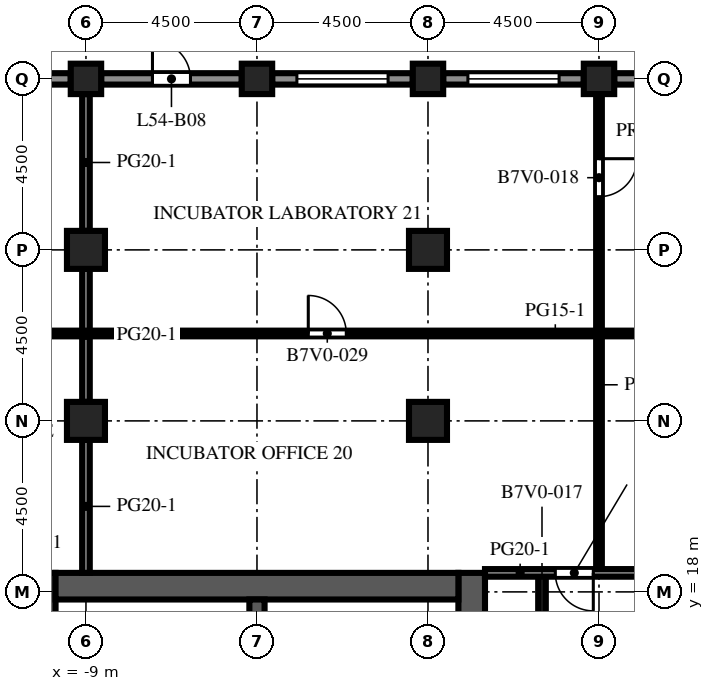
"""IFC4 building model, lengths in metres.
Left out: names, types, materials, properties, quantities, classifications, styles, units other than length and angle.
Written with IfcOpenShell. Run it as: python <this file> out.ifc"""

import sys

from ifc_helpers import new_model, si_unit, direction, frame, frame_2d, origin, origin_2d, place, context, subcontext, project, spatial, rectangle, extrude, element, fill, save


model = new_model("IFC4")
c1 = context("Model", 3, precision=1e-05, world=origin(), true_north=direction((0.0, 1.0)))
c2 = subcontext(c1, "Body", "Model", "MODEL_VIEW")
j1 = project(units=[si_unit("LENGTHUNIT", "METRE"), si_unit("PLANEANGLEUNIT", "RADIAN")], contexts=[c1])
p1 = place(None, origin())
s1 = spatial("IfcSite", under=j1, at=p1, CompositionType="ELEMENT")
p2 = place(p1, origin())
s2 = spatial("IfcBuilding", under=s1, at=p2, CompositionType="ELEMENT")
p3 = place(p2, frame((0.0, 0.0, 239.8)))
s3 = spatial("IfcBuildingStorey", under=s2, at=p3, CompositionType="ELEMENT", Elevation=239.8)
for number, where, z_axis, x_axis in (
    (1, (-9.0, 31.5, 0.0), (0.0, 0.0, 1.0), (1.0, 0.0, 0.0)),
    (2, (-4.5, 31.5, 0.0), (0.0, 0.0, 1.0), (1.0, 0.0, 0.0)),
    (3, (0.0, 31.5, 0.0), (0.0, 0.0, 1.0), (1.0, 0.0, 0.0)),
    (4, (4.5, 31.5, 0.0), (0.0, 0.0, 1.0), (1.0, 0.0, 0.0)),
):
    element("IfcColumn", number, at=place(p3, frame(where, z_axis=z_axis, x_axis=x_axis)), inside=s3, PredefinedType="COLUMN", context=c2, shape_type="SweptSolid", body=[
        extrude(rectangle(XDim=0.8, YDim=0.8, at=origin_2d()), origin(), (0.0, 0.0, 1.0), 4.1),
    ])
for number, where, z_axis, x_axis in (
    (5, (-9.0, 22.5, 0.0), (0.0, 0.0, 1.0), (1.0, 0.0, 0.0)),
    (6, (-9.0, 27.0, 0.0), (0.0, 0.0, 1.0), (1.0, 0.0, 0.0)),
    (7, (0.0, 22.5, 0.0), (0.0, 0.0, 1.0), (1.0, 0.0, 0.0)),
    (8, (0.0, 27.0, 0.0), (0.0, 0.0, 1.0), (1.0, 0.0, 0.0)),
):
    element("IfcColumn", number, at=place(p3, frame(where, z_axis=z_axis, x_axis=x_axis)), inside=s3, PredefinedType="COLUMN", context=c2, shape_type="SweptSolid", body=[
        extrude(rectangle(XDim=1.0, YDim=1.0, at=origin_2d()), origin(), (0.0, 0.0, 1.0), 4.1),
    ])
p4 = place(p3, frame((-10.15, -9.0, 0.0), z_axis=(0.0, 0.0, 1.0), x_axis=(0.0, 1.0, 0.0)))
e9 = element("IfcWall", 9, at=p4, inside=s3, PredefinedType="SHEAR", context=c2, shape_type="SweptSolid", body=[
    extrude(rectangle(XDim=27.5, YDim=0.7, at=frame_2d((13.75, 0.0))), origin(), (0.0, 0.0, 1.0), 4.1),
])
p5 = place(p4, frame((12.55, 0.0, 0.0)))
e10 = element("IfcOpeningElement", 10, at=p5, cuts=e9, PredefinedType="OPENING", context=c2, shape_type="SweptSolid", body=[
    extrude(rectangle(XDim=2.4, YDim=2.4, at=frame_2d((1.2, 1.2))), frame((0.0, 0.36, 0.0), z_axis=(0.0, -1.0, 0.0), x_axis=(1.0, 0.0, 0.0)), (0.0, 0.0, 1.0), 0.72),
])
p6 = place(p4, frame((6.825, 0.0, 0.0)))
e11 = element("IfcOpeningElement", 11, at=p6, cuts=e9, PredefinedType="OPENING", context=c2, shape_type="SweptSolid", body=[
    extrude(rectangle(XDim=1.2, YDim=2.1, at=frame_2d((0.6, 1.05))), frame((0.0, 0.36, 0.0), z_axis=(0.0, -1.0, 0.0), x_axis=(1.0, 0.0, 0.0)), (0.0, 0.0, 1.0), 0.72),
])
p7 = place(p4, frame((19.475, 0.0, 0.0)))
e12 = element("IfcOpeningElement", 12, at=p7, cuts=e9, PredefinedType="OPENING", context=c2, shape_type="SweptSolid", body=[
    extrude(rectangle(XDim=1.2, YDim=2.1, at=frame_2d((0.6, 1.05))), frame((0.0, 0.36, 0.0), z_axis=(0.0, -1.0, 0.0), x_axis=(1.0, 0.0, 0.0)), (0.0, 0.0, 1.0), 0.72),
])
p8 = place(p3, frame((1.15, -9.0, 0.0), z_axis=(0.0, 0.0, 1.0), x_axis=(0.0, 1.0, 0.0)))
e13 = element("IfcWall", 13, at=p8, inside=s3, PredefinedType="SHEAR", context=c2, shape_type="SweptSolid", body=[
    extrude(rectangle(XDim=27.5, YDim=0.7, at=frame_2d((13.75, 0.0))), origin(), (0.0, 0.0, 1.0), 4.1),
])
p9 = place(p8, frame((12.55, 0.0, 0.0)))
e14 = element("IfcOpeningElement", 14, at=p9, cuts=e13, PredefinedType="OPENING", context=c2, shape_type="SweptSolid", body=[
    extrude(rectangle(XDim=2.4, YDim=2.4, at=frame_2d((1.2, 1.2))), frame((0.0, 0.36, 0.0), z_axis=(0.0, -1.0, 0.0), x_axis=(1.0, 0.0, 0.0)), (0.0, 0.0, 1.0), 0.72),
])
p10 = place(p8, frame((5.42, 0.0, 0.0)))
e15 = element("IfcOpeningElement", 15, at=p10, cuts=e13, PredefinedType="OPENING", context=c2, shape_type="SweptSolid", body=[
    extrude(rectangle(XDim=1.2, YDim=2.1, at=frame_2d((0.6, 1.05))), frame((0.0, 0.36, 0.0), z_axis=(0.0, -1.0, 0.0), x_axis=(1.0, 0.0, 0.0)), (0.0, 0.0, 1.0), 0.72),
])
p11 = place(p8, frame((19.46, 0.0, 0.0)))
e16 = element("IfcOpeningElement", 16, at=p11, cuts=e13, PredefinedType="OPENING", context=c2, shape_type="SweptSolid", body=[
    extrude(rectangle(XDim=1.0, YDim=2.1, at=frame_2d((0.5, 1.05))), frame((0.0, 0.36, 0.0), z_axis=(0.0, -1.0, 0.0), x_axis=(1.0, 0.0, 0.0)), (0.0, 0.0, 1.0), 0.72),
])
p12 = place(p8, frame((21.17, 0.0, 0.0)))
e17 = element("IfcOpeningElement", 17, at=p12, cuts=e13, PredefinedType="OPENING", context=c2, shape_type="SweptSolid", body=[
    extrude(rectangle(XDim=1.0, YDim=2.1, at=frame_2d((0.5, 1.05))), frame((0.0, 0.36, 0.0), z_axis=(0.0, -1.0, 0.0), x_axis=(1.0, 0.0, 0.0)), (0.0, 0.0, 1.0), 0.72),
])
p13 = place(p8, frame((23.26, 0.0, 0.0)))
e18 = element("IfcOpeningElement", 18, at=p13, cuts=e13, PredefinedType="OPENING", context=c2, shape_type="SweptSolid", body=[
    extrude(rectangle(XDim=1.0, YDim=2.1, at=frame_2d((0.5, 1.05))), frame((0.0, 0.36, 0.0), z_axis=(0.0, -1.0, 0.0), x_axis=(1.0, 0.0, 0.0)), (0.0, 0.0, 1.0), 0.72),
])
p14 = place(p8, frame((25.35, 0.0, 0.0)))
e19 = element("IfcOpeningElement", 19, at=p14, cuts=e13, PredefinedType="OPENING", context=c2, shape_type="SweptSolid", body=[
    extrude(rectangle(XDim=1.0, YDim=2.1, at=frame_2d((0.5, 1.05))), frame((0.0, 0.36, 0.0), z_axis=(0.0, -1.0, 0.0), x_axis=(1.0, 0.0, 0.0)), (0.0, 0.0, 1.0), 0.72),
])
p15 = place(p3, frame((-9.8, 18.15, 0.0), z_axis=(0.0, 0.0, 1.0), x_axis=(1.0, 0.0, 0.0)))
e20 = element("IfcWall", 20, at=p15, inside=s3, PredefinedType="SHEAR", context=c2, shape_type="SweptSolid", body=[
    extrude(rectangle(XDim=10.6, YDim=0.7, at=frame_2d((5.3, 0.0))), origin(), (0.0, 0.0, 1.0), 4.1),
])
p16 = place(p3, frame((-4.5, 10.2, 0.0), z_axis=(0.0, 0.0, 1.0), x_axis=(0.0, 1.0, 0.0)))
e21 = element("IfcWall", 21, at=p16, inside=s3, PredefinedType="SHEAR", context=c2, shape_type="SweptSolid", body=[
    extrude(rectangle(XDim=7.6, YDim=0.4, at=frame_2d((3.8, 0.0))), origin(), (0.0, 0.0, 1.0), 4.1),
])
p17 = place(p3, frame((4.9, 31.5, 0.0), z_axis=(0.0, 0.0, 1.0), x_axis=(1.0, 0.0, 0.0)))
e22 = element("IfcWall", 22, at=p17, inside=s3, PredefinedType="SOLIDWALL", context=c2, shape_type="SweptSolid", body=[
    extrude(rectangle(XDim=3.7, YDim=0.3, at=frame_2d((1.85, 0.0))), origin(), (0.0, 0.0, 1.0), 2.85),
])
p18 = place(p17, frame((0.65, 0.0, 0.8)))
e23 = element("IfcOpeningElement", 23, at=p18, cuts=e22, PredefinedType="OPENING", context=c2, shape_type="SweptSolid", body=[
    extrude(rectangle(XDim=2.4, YDim=1.7, at=frame_2d((1.2, 0.85))), frame((0.0, 0.16, 0.0), z_axis=(0.0, -1.0, 0.0), x_axis=(1.0, 0.0, 0.0)), (0.0, 0.0, 1.0), 0.32),
])
p19 = place(p3, frame((0.4, 31.5, 0.0), z_axis=(0.0, 0.0, 1.0), x_axis=(1.0, 0.0, 0.0)))
e24 = element("IfcWall", 24, at=p19, inside=s3, PredefinedType="SOLIDWALL", context=c2, shape_type="SweptSolid", body=[
    extrude(rectangle(XDim=3.7, YDim=0.3, at=frame_2d((1.85, 0.0))), origin(), (0.0, 0.0, 1.0), 2.85),
])
p20 = place(p19, frame((0.65, 0.0, 0.8)))
e25 = element("IfcOpeningElement", 25, at=p20, cuts=e24, PredefinedType="OPENING", context=c2, shape_type="SweptSolid", body=[
    extrude(rectangle(XDim=2.4, YDim=1.7, at=frame_2d((1.2, 0.85))), frame((0.0, 0.16, 0.0), z_axis=(0.0, -1.0, 0.0), x_axis=(1.0, 0.0, 0.0)), (0.0, 0.0, 1.0), 0.32),
])
p21 = place(p3, frame((-4.1, 31.5, 0.0), z_axis=(0.0, 0.0, 1.0), x_axis=(1.0, 0.0, 0.0)))
e26 = element("IfcWall", 26, at=p21, inside=s3, PredefinedType="SOLIDWALL", context=c2, shape_type="SweptSolid", body=[
    extrude(rectangle(XDim=3.7, YDim=0.3, at=frame_2d((1.85, 0.0))), origin(), (0.0, 0.0, 1.0), 2.85),
])
p22 = place(p21, frame((0.65, 0.0, 0.8)))
e27 = element("IfcOpeningElement", 27, at=p22, cuts=e26, PredefinedType="OPENING", context=c2, shape_type="SweptSolid", body=[
    extrude(rectangle(XDim=2.4, YDim=1.7, at=frame_2d((1.2, 0.85))), frame((0.0, 0.16, 0.0), z_axis=(0.0, -1.0, 0.0), x_axis=(1.0, 0.0, 0.0)), (0.0, 0.0, 1.0), 0.32),
])
p23 = place(p3, frame((-8.6, 31.5, 0.0), z_axis=(0.0, 0.0, 1.0), x_axis=(1.0, 0.0, 0.0)))
e28 = element("IfcWall", 28, at=p23, inside=s3, PredefinedType="SOLIDWALL", context=c2, shape_type="SweptSolid", body=[
    extrude(rectangle(XDim=3.7, YDim=0.3, at=frame_2d((1.85, 0.0))), origin(), (0.0, 0.0, 1.0), 2.85),
])
p24 = place(p23, frame((1.35, 0.0, 0.0)))
e29 = element("IfcOpeningElement", 29, at=p24, cuts=e28, PredefinedType="OPENING", context=c2, shape_type="SweptSolid", body=[
    extrude(rectangle(XDim=1.0, YDim=2.2, at=frame_2d((0.5, 1.1))), frame((0.0, 0.16, 0.0), z_axis=(0.0, -1.0, 0.0), x_axis=(1.0, 0.0, 0.0)), (0.0, 0.0, 1.0), 0.32),
])
p25 = place(p3, frame((-13.1, 31.5, 0.0), z_axis=(0.0, 0.0, 1.0), x_axis=(1.0, 0.0, 0.0)))
e30 = element("IfcWall", 30, at=p25, inside=s3, PredefinedType="SOLIDWALL", context=c2, shape_type="SweptSolid", body=[
    extrude(rectangle(XDim=3.7, YDim=0.3, at=frame_2d((1.85, 0.0))), origin(), (0.0, 0.0, 1.0), 2.85),
])
p26 = place(p25, frame((0.65, 0.0, 0.8)))
e31 = element("IfcOpeningElement", 31, at=p26, cuts=e30, PredefinedType="OPENING", context=c2, shape_type="SweptSolid", body=[
    extrude(rectangle(XDim=2.4, YDim=1.7, at=frame_2d((1.2, 0.85))), frame((0.0, 0.16, 0.0), z_axis=(0.0, -1.0, 0.0), x_axis=(1.0, 0.0, 0.0)), (0.0, 0.0, 1.0), 0.32),
])
for number, where, z_axis, x_axis in (
    (32, (-9.0, 18.5, 0.0), (0.0, 0.0, 1.0), (0.0, 1.0, 0.0)),
    (33, (-9.0, 23.0, 0.0), (0.0, 0.0, 1.0), (0.0, 1.0, 0.0)),
):
    element("IfcWall", number, at=place(p3, frame(where, z_axis=z_axis, x_axis=x_axis)), inside=s3, PredefinedType="PARTITIONING", context=c2, shape_type="SweptSolid", body=[
        extrude(rectangle(XDim=3.5, YDim=0.2, at=frame_2d((1.75, 0.0))), origin(), (0.0, 0.0, 1.0), 3.65),
    ])
p27 = place(p3, frame((-9.0, 27.5, 0.0), z_axis=(0.0, 0.0, 1.0), x_axis=(0.0, 1.0, 0.0)))
e34 = element("IfcWall", 34, at=p27, inside=s3, PredefinedType="PARTITIONING", context=c2, shape_type="SweptSolid", body=[
    extrude(rectangle(XDim=3.6, YDim=0.2, at=frame_2d((1.8, 0.0))), origin(), (0.0, 0.0, 1.0), 3.65),
])
p28 = place(p3, frame((3.0, 6.7, 0.0), z_axis=(0.0, 0.0, 1.0), x_axis=(0.0, 1.0, 0.0)))
e35 = element("IfcWall", 35, at=p28, inside=s3, PredefinedType="PARTITIONING", context=c2, shape_type="SweptSolid", body=[
    extrude(rectangle(XDim=11.8, YDim=0.2, at=frame_2d((5.9, 0.0))), origin(), (0.0, 0.0, 1.0), 3.65),
])
p29 = place(p28, frame((6.6, 0.0, 0.0)))
e36 = element("IfcOpeningElement", 36, at=p29, cuts=e35, PredefinedType="OPENING", context=c2, shape_type="SweptSolid", body=[
    extrude(rectangle(XDim=1.0, YDim=2.1, at=frame_2d((0.5, 1.05))), frame((0.0, 0.11, 0.0), z_axis=(0.0, -1.0, 0.0), x_axis=(1.0, 0.0, 0.0)), (0.0, 0.0, 1.0), 0.22),
])
p30 = place(p3, frame((4.5, 31.1, 0.0), z_axis=(0.0, 0.0, 1.0), x_axis=(0.0, -1.0, 0.0)))
e37 = element("IfcWall", 37, at=p30, inside=s3, PredefinedType="PARTITIONING", context=c2, shape_type="SweptSolid", body=[
    extrude(rectangle(XDim=12.6, YDim=0.15, at=frame_2d((6.3, 0.0))), origin(), (0.0, 0.0, 1.0), 3.65),
])
p31 = place(p30, frame((1.7, 0.0, 0.0)))
e38 = element("IfcOpeningElement", 38, at=p31, cuts=e37, PredefinedType="OPENING", context=c2, shape_type="SweptSolid", body=[
    extrude(rectangle(XDim=1.0, YDim=2.1, at=frame_2d((0.5, 1.05))), frame((0.0, 0.085, 0.0), z_axis=(0.0, -1.0, 0.0), x_axis=(1.0, 0.0, 0.0)), (0.0, 0.0, 1.0), 0.17),
])
p32 = place(p3, frame((1.5, 18.5, 0.0), z_axis=(0.0, 0.0, 1.0), x_axis=(1.0, 0.0, 0.0)))
e39 = element("IfcWall", 39, at=p32, inside=s3, PredefinedType="PARTITIONING", context=c2, shape_type="SweptSolid", body=[
    extrude(rectangle(XDim=4.5, YDim=0.2, at=frame_2d((2.25, 0.0))), origin(), (0.0, 0.0, 1.0), 3.65),
])
p33 = place(p32, frame((1.85, 0.0, 0.0)))
e40 = element("IfcOpeningElement", 40, at=p33, cuts=e39, PredefinedType="OPENING", context=c2, shape_type="SweptSolid", body=[
    extrude(rectangle(XDim=1.0, YDim=2.1, at=frame_2d((0.5, 1.05))), frame((0.0, 0.11, 0.0), z_axis=(0.0, -1.0, 0.0), x_axis=(1.0, 0.0, 0.0)), (0.0, 0.0, 1.0), 0.22),
])
p34 = place(p3, frame((-13.5, 24.8, 0.0), z_axis=(0.0, 0.0, 1.0), x_axis=(1.0, 0.0, 0.0)))
e41 = element("IfcWall", 41, at=p34, inside=s3, PredefinedType="PARTITIONING", context=c2, shape_type="SweptSolid", body=[
    extrude(rectangle(XDim=34.5, YDim=0.15, at=frame_2d((17.25, 0.0))), origin(), (0.0, 0.0, 1.0), 3.65),
])
p35 = place(p34, frame((1.6, 0.0, 0.0)))
e42 = element("IfcOpeningElement", 42, at=p35, cuts=e41, PredefinedType="OPENING", context=c2, shape_type="SweptSolid", body=[
    extrude(rectangle(XDim=1.0, YDim=2.1, at=frame_2d((0.5, 1.05))), frame((0.0, 0.085, 0.0), z_axis=(0.0, -1.0, 0.0), x_axis=(1.0, 0.0, 0.0)), (0.0, 0.0, 1.0), 0.17),
])
p36 = place(p34, frame((10.35, 0.0, 0.0)))
e43 = element("IfcOpeningElement", 43, at=p36, cuts=e41, PredefinedType="OPENING", context=c2, shape_type="SweptSolid", body=[
    extrude(rectangle(XDim=1.0, YDim=2.1, at=frame_2d((0.5, 1.05))), frame((0.0, 0.085, 0.0), z_axis=(0.0, -1.0, 0.0), x_axis=(1.0, 0.0, 0.0)), (0.0, 0.0, 1.0), 0.17),
])
p37 = place(p34, frame((22.35, 0.0, 0.0)))
e44 = element("IfcOpeningElement", 44, at=p37, cuts=e41, PredefinedType="OPENING", context=c2, shape_type="SweptSolid", body=[
    extrude(rectangle(XDim=1.0, YDim=2.1, at=frame_2d((0.5, 1.05))), frame((0.0, 0.085, 0.0), z_axis=(0.0, -1.0, 0.0), x_axis=(1.0, 0.0, 0.0)), (0.0, 0.0, 1.0), 0.17),
])
p38 = place(p34, frame((31.1, 0.0, 0.0)))
e45 = element("IfcOpeningElement", 45, at=p38, cuts=e41, PredefinedType="OPENING", context=c2, shape_type="SweptSolid", body=[
    extrude(rectangle(XDim=1.0, YDim=2.1, at=frame_2d((0.5, 1.05))), frame((0.0, 0.085, 0.0), z_axis=(0.0, -1.0, 0.0), x_axis=(1.0, 0.0, 0.0)), (0.0, 0.0, 1.0), 0.17),
])
p39 = place(p20, origin())
e46 = element("IfcWindow", 46, at=p39, inside=s3, PartitioningType="SINGLE_PANEL", PredefinedType="WINDOW", context=c2, shape_type="SweptSolid", body=[
    extrude(rectangle(XDim=2.4, YDim=1.7, at=frame_2d((1.2, 0.85))), frame((0.0, 0.03, 0.0), z_axis=(0.0, -1.0, 0.0), x_axis=(1.0, 0.0, 0.0)), (0.0, 0.0, 1.0), 0.06),
])
fill(e25, e46)
p40 = place(p22, origin())
e47 = element("IfcWindow", 47, at=p40, inside=s3, PartitioningType="SINGLE_PANEL", PredefinedType="WINDOW", context=c2, shape_type="SweptSolid", body=[
    extrude(rectangle(XDim=2.4, YDim=1.7, at=frame_2d((1.2, 0.85))), frame((0.0, 0.03, 0.0), z_axis=(0.0, -1.0, 0.0), x_axis=(1.0, 0.0, 0.0)), (0.0, 0.0, 1.0), 0.06),
])
fill(e27, e47)
p41 = place(p24, origin())
e48 = element("IfcDoor", 48, at=p41, inside=s3, OperationType="SINGLE_SWING_LEFT", PredefinedType="DOOR", context=c2, shape_type="SweptSolid", body=[
    extrude(rectangle(XDim=1.0, YDim=2.2, at=frame_2d((0.5, 1.1))), frame((0.0, 0.025, 0.0), z_axis=(0.0, -1.0, 0.0), x_axis=(1.0, 0.0, 0.0)), (0.0, 0.0, 1.0), 0.05),
])
fill(e29, e48)
p42 = place(p31, origin())
e49 = element("IfcDoor", 49, at=p42, inside=s3, OperationType="SINGLE_SWING_LEFT", PredefinedType="DOOR", context=c2, shape_type="SweptSolid", body=[
    extrude(rectangle(XDim=1.0, YDim=2.1, at=frame_2d((0.5, 1.05))), frame((0.0, 0.025, 0.0), z_axis=(0.0, -1.0, 0.0), x_axis=(1.0, 0.0, 0.0)), (0.0, 0.0, 1.0), 0.05),
])
fill(e38, e49)
p43 = place(p33, origin())
e50 = element("IfcDoor", 50, at=p43, inside=s3, OperationType="SINGLE_SWING_RIGHT", PredefinedType="DOOR", context=c2, shape_type="SweptSolid", body=[
    extrude(rectangle(XDim=1.0, YDim=2.1, at=frame_2d((0.5, 1.05))), frame((0.0, 0.025, 0.0), z_axis=(0.0, -1.0, 0.0), x_axis=(1.0, 0.0, 0.0)), (0.0, 0.0, 1.0), 0.05),
])
fill(e40, e50)
p44 = place(p36, origin())
e51 = element("IfcDoor", 51, at=p44, inside=s3, OperationType="SINGLE_SWING_LEFT", PredefinedType="DOOR", context=c2, shape_type="SweptSolid", body=[
    extrude(rectangle(XDim=1.0, YDim=2.1, at=frame_2d((0.5, 1.05))), frame((0.0, 0.025, 0.0), z_axis=(0.0, -1.0, 0.0), x_axis=(1.0, 0.0, 0.0)), (0.0, 0.0, 1.0), 0.05),
])
fill(e43, e51)
save(model, sys.argv[1])
